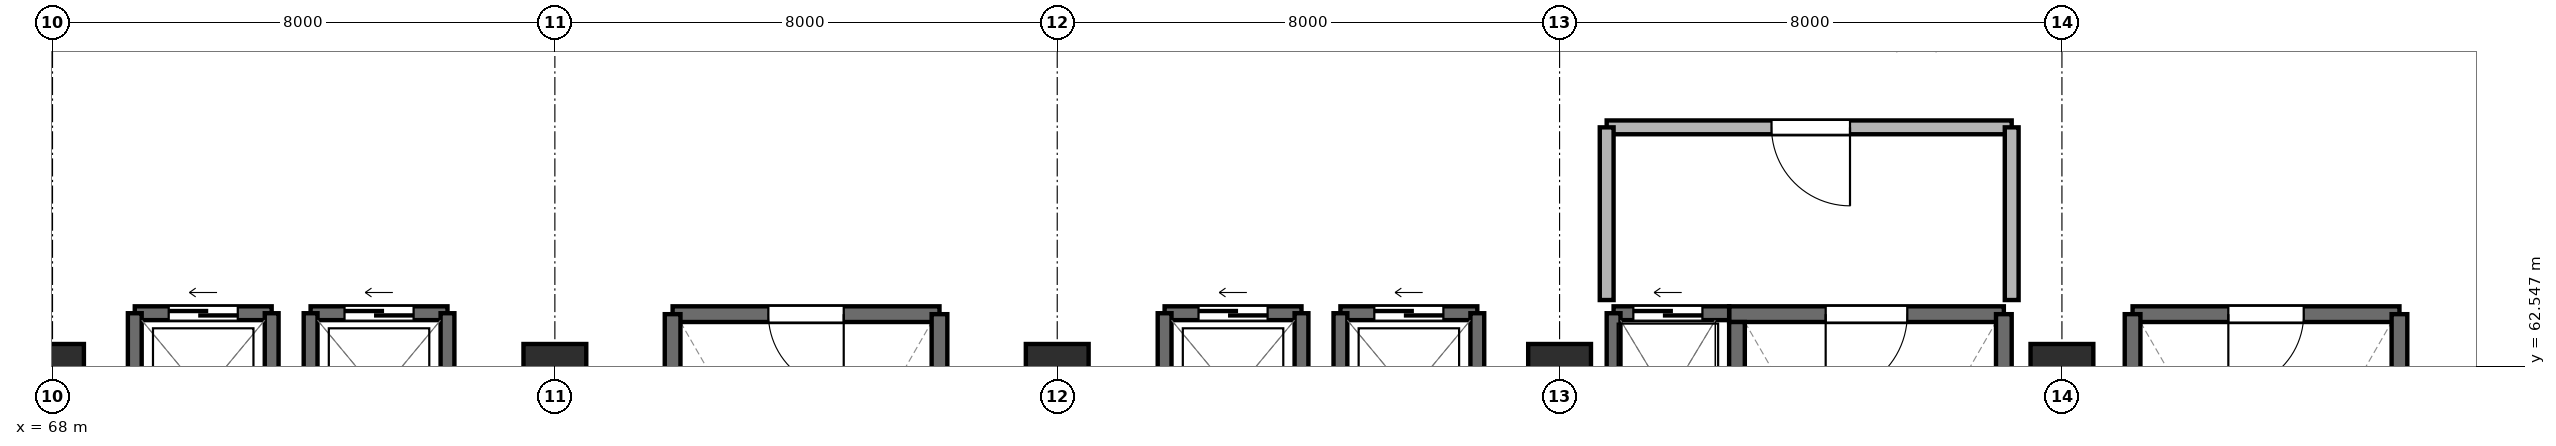
"""IFC4 building model, lengths in metres.
Left out: names, types, materials, properties, quantities, classifications, styles, units other than length and angle.
Written with IfcOpenShell. Run it as: python <this file> out.ifc"""

import sys

from ifc_helpers import new_model, si_unit, direction, frame, frame_2d, origin, origin_2d, place, context, subcontext, project, spatial, rectangle, extrude, element, fill, save


model = new_model("IFC4")
c1 = context("Model", 3, precision=1e-05, world=origin(), true_north=direction((0.0, 1.0)))
c2 = subcontext(c1, "Body", "Model", "MODEL_VIEW")
j1 = project(units=[si_unit("LENGTHUNIT", "METRE"), si_unit("PLANEANGLEUNIT", "RADIAN")], contexts=[c1])
p1 = place(None, origin())
s1 = spatial("IfcSite", under=j1, at=p1, CompositionType="ELEMENT")
p2 = place(p1, origin())
s2 = spatial("IfcBuilding", under=s1, at=p2, CompositionType="ELEMENT")
p3 = place(p2, frame((0.0, 0.0, 4.6)))
s3 = spatial("IfcBuildingStorey", under=s2, at=p3, CompositionType="ELEMENT", Elevation=4.6)
for number, where, z_axis, x_axis in (
    (1, (68.0, 62.4, -0.3), (0.0, 0.0, 1.0), (1.0, 0.0, 0.0)),
    (2, (76.0, 62.4, -0.3), (0.0, 0.0, 1.0), (1.0, 0.0, 0.0)),
    (3, (84.0, 62.4, -0.3), (0.0, 0.0, 1.0), (1.0, 0.0, 0.0)),
    (4, (92.0, 62.4, -0.3), (0.0, 0.0, 1.0), (1.0, 0.0, 0.0)),
    (5, (100.0, 62.4, -0.3), (0.0, 0.0, 1.0), (1.0, 0.0, 0.0)),
):
    element("IfcColumn", number, at=place(p3, frame(where, z_axis=z_axis, x_axis=x_axis)), inside=s3, PredefinedType="COLUMN", context=c2, shape_type="SweptSolid", body=[
        extrude(rectangle(XDim=1.0, YDim=1.0, at=origin_2d()), origin(), (0.0, 0.0, 1.0), 4.65),
    ])
p4 = place(p3, frame((99.075, 63.375, 0.0), z_axis=(0.0, 0.0, 1.0), x_axis=(-1.0, 0.0, 0.0)))
e6 = element("IfcWall", 6, at=p4, inside=s3, PredefinedType="SHEAR", context=c2, shape_type="SweptSolid", body=[
    extrude(rectangle(XDim=4.375, YDim=0.25, at=frame_2d((2.188, 0.0))), origin(), (0.0, 0.0, 1.0), 4.48),
])
p5 = place(p4, frame((1.538, 0.0, 0.0)))
e7 = element("IfcOpeningElement", 7, at=p5, cuts=e6, PredefinedType="OPENING", context=c2, shape_type="SweptSolid", body=[
    extrude(rectangle(XDim=1.3, YDim=2.2, at=frame_2d((0.65, 1.1))), frame((0.0, 0.137, 0.0), z_axis=(0.0, -1.0, 0.0), x_axis=(1.0, 0.0, 0.0)), (0.0, 0.0, 1.0), 0.274),
])
p6 = place(p3, frame((94.825, 63.25, 0.0), z_axis=(0.0, 0.0, 1.0), x_axis=(0.0, -1.0, 0.0)))
e8 = element("IfcWall", 8, at=p6, inside=s3, PredefinedType="SHEAR", context=c2, shape_type="SweptSolid", body=[
    extrude(rectangle(XDim=7.075, YDim=0.25, at=frame_2d((3.538, 0.0))), origin(), (0.0, 0.0, 1.0), 4.48),
])
p7 = place(p3, frame((99.075, 56.175, 0.0), z_axis=(0.0, 0.0, 1.0), x_axis=(0.0, 1.0, 0.0)))
e9 = element("IfcWall", 9, at=p7, inside=s3, PredefinedType="SHEAR", context=c2, shape_type="SweptSolid", body=[
    extrude(rectangle(XDim=7.2, YDim=0.25, at=frame_2d((3.6, 0.0))), origin(), (0.0, 0.0, 1.0), 4.48),
])
p8 = place(p3, frame((82.125, 63.375, 0.0), z_axis=(0.0, 0.0, 1.0), x_axis=(-1.0, 0.0, 0.0)))
e10 = element("IfcWall", 10, at=p8, inside=s3, PredefinedType="SHEAR", context=c2, shape_type="SweptSolid", body=[
    extrude(rectangle(XDim=4.25, YDim=0.25, at=frame_2d((2.125, 0.0))), origin(), (0.0, 0.0, 1.0), 4.48),
])
p9 = place(p8, frame((1.525, 0.0, 0.0)))
e11 = element("IfcOpeningElement", 11, at=p9, cuts=e10, PredefinedType="OPENING", context=c2, shape_type="SweptSolid", body=[
    extrude(rectangle(XDim=1.2, YDim=2.2, at=frame_2d((0.6, 1.1))), frame((0.0, 0.137, 0.0), z_axis=(0.0, -1.0, 0.0), x_axis=(1.0, 0.0, 0.0)), (0.0, 0.0, 1.0), 0.274),
])
for number, where, z_axis, x_axis in (
    (12, (77.875, 63.375, 0.0), (0.0, 0.0, 1.0), (0.0, -1.0, 0.0)),
    (13, (82.125, 56.175, 0.0), (0.0, 0.0, 1.0), (0.0, 1.0, 0.0)),
):
    element("IfcWall", number, at=place(p3, frame(where, z_axis=z_axis, x_axis=x_axis)), inside=s3, PredefinedType="SHEAR", context=c2, shape_type="SweptSolid", body=[
        extrude(rectangle(XDim=7.2, YDim=0.25, at=frame_2d((3.6, 0.0))), origin(), (0.0, 0.0, 1.0), 4.48),
    ])
p10 = place(p3, frame((105.375, 63.375, 0.0), z_axis=(0.0, 0.0, 1.0), x_axis=(-1.0, 0.0, 0.0)))
e14 = element("IfcWall", 14, at=p10, inside=s3, PredefinedType="SHEAR", context=c2, shape_type="SweptSolid", body=[
    extrude(rectangle(XDim=4.25, YDim=0.25, at=frame_2d((2.125, 0.0))), origin(), (0.0, 0.0, 1.0), 4.48),
])
p11 = place(p10, frame((1.525, 0.0, 0.0)))
e15 = element("IfcOpeningElement", 15, at=p11, cuts=e14, PredefinedType="OPENING", context=c2, shape_type="SweptSolid", body=[
    extrude(rectangle(XDim=1.2, YDim=2.2, at=frame_2d((0.6, 1.1))), frame((0.0, 0.137, 0.0), z_axis=(0.0, -1.0, 0.0), x_axis=(1.0, 0.0, 0.0)), (0.0, 0.0, 1.0), 0.274),
])
for number, where, z_axis, x_axis in (
    (16, (101.125, 63.375, 0.0), (0.0, 0.0, 1.0), (0.0, -1.0, 0.0)),
    (17, (105.375, 56.175, 0.0), (0.0, 0.0, 1.0), (0.0, 1.0, 0.0)),
):
    element("IfcWall", number, at=place(p3, frame(where, z_axis=z_axis, x_axis=x_axis)), inside=s3, PredefinedType="SHEAR", context=c2, shape_type="SweptSolid", body=[
        extrude(rectangle(XDim=7.2, YDim=0.25, at=frame_2d((3.6, 0.0))), origin(), (0.0, 0.0, 1.0), 4.48),
    ])
p12 = place(p3, frame((94.7, 63.39, 0.0), z_axis=(0.0, 0.0, 1.0), x_axis=(-1.0, 0.0, 0.0)))
e18 = element("IfcWall", 18, at=p12, inside=s3, PredefinedType="SHEAR", context=c2, shape_type="SweptSolid", body=[
    extrude(rectangle(XDim=1.84, YDim=0.22, at=frame_2d((0.92, 0.0))), origin(), (0.0, 0.0, 1.0), 4.35),
])
p13 = place(p12, frame((0.425, 0.0, 0.0)))
e19 = element("IfcOpeningElement", 19, at=p13, cuts=e18, PredefinedType="OPENING", context=c2, shape_type="SweptSolid", body=[
    extrude(rectangle(XDim=1.1, YDim=2.2, at=frame_2d((0.55, 1.1))), frame((0.0, 0.122, 0.0), z_axis=(0.0, -1.0, 0.0), x_axis=(1.0, 0.0, 0.0)), (0.0, 0.0, 1.0), 0.244),
])
p14 = place(p3, frame((92.86, 63.39, 0.0), z_axis=(0.0, 0.0, 1.0), x_axis=(0.0, -1.0, 0.0)))
e20 = element("IfcWall", 20, at=p14, inside=s3, PredefinedType="SHEAR", context=c2, shape_type="SweptSolid", body=[
    extrude(rectangle(XDim=2.73, YDim=0.22, at=frame_2d((1.365, 0.0))), origin(), (0.0, 0.0, 1.0), 4.35),
])
p15 = place(p3, frame((71.49, 63.39, 0.0), z_axis=(0.0, 0.0, 1.0), x_axis=(-1.0, 0.0, 0.0)))
e21 = element("IfcWall", 21, at=p15, inside=s3, PredefinedType="SHEAR", context=c2, shape_type="SweptSolid", body=[
    extrude(rectangle(XDim=2.18, YDim=0.22, at=frame_2d((1.09, 0.0))), origin(), (0.0, 0.0, 1.0), 4.35),
])
p16 = place(p15, frame((0.54, 0.0, 0.0)))
e22 = element("IfcOpeningElement", 22, at=p16, cuts=e21, PredefinedType="OPENING", context=c2, shape_type="SweptSolid", body=[
    extrude(rectangle(XDim=1.1, YDim=2.2, at=frame_2d((0.55, 1.1))), frame((0.0, 0.122, 0.0), z_axis=(0.0, -1.0, 0.0), x_axis=(1.0, 0.0, 0.0)), (0.0, 0.0, 1.0), 0.244),
])
for number, where, z_axis, x_axis in (
    (23, (69.31, 63.39, 0.0), (0.0, 0.0, 1.0), (0.0, -1.0, 0.0)),
    (24, (71.49, 60.81, 0.0), (0.0, 0.0, 1.0), (0.0, 1.0, 0.0)),
):
    element("IfcWall", number, at=place(p3, frame(where, z_axis=z_axis, x_axis=x_axis)), inside=s3, PredefinedType="SHEAR", context=c2, shape_type="SweptSolid", body=[
        extrude(rectangle(XDim=2.58, YDim=0.22, at=frame_2d((1.29, 0.0))), origin(), (0.0, 0.0, 1.0), 4.35),
    ])
p17 = place(p3, frame((74.29, 63.39, 0.0), z_axis=(0.0, 0.0, 1.0), x_axis=(-1.0, 0.0, 0.0)))
e25 = element("IfcWall", 25, at=p17, inside=s3, PredefinedType="SHEAR", context=c2, shape_type="SweptSolid", body=[
    extrude(rectangle(XDim=2.18, YDim=0.22, at=frame_2d((1.09, 0.0))), origin(), (0.0, 0.0, 1.0), 4.35),
])
p18 = place(p17, frame((0.54, 0.0, 0.0)))
e26 = element("IfcOpeningElement", 26, at=p18, cuts=e25, PredefinedType="OPENING", context=c2, shape_type="SweptSolid", body=[
    extrude(rectangle(XDim=1.1, YDim=2.2, at=frame_2d((0.55, 1.1))), frame((0.0, 0.122, 0.0), z_axis=(0.0, -1.0, 0.0), x_axis=(1.0, 0.0, 0.0)), (0.0, 0.0, 1.0), 0.244),
])
for number, where, z_axis, x_axis in (
    (27, (72.11, 63.39, 0.0), (0.0, 0.0, 1.0), (0.0, -1.0, 0.0)),
    (28, (74.29, 60.81, 0.0), (0.0, 0.0, 1.0), (0.0, 1.0, 0.0)),
):
    element("IfcWall", number, at=place(p3, frame(where, z_axis=z_axis, x_axis=x_axis)), inside=s3, PredefinedType="SHEAR", context=c2, shape_type="SweptSolid", body=[
        extrude(rectangle(XDim=2.58, YDim=0.22, at=frame_2d((1.29, 0.0))), origin(), (0.0, 0.0, 1.0), 4.35),
    ])
p19 = place(p3, frame((87.89, 63.39, 0.0), z_axis=(0.0, 0.0, 1.0), x_axis=(-1.0, 0.0, 0.0)))
e29 = element("IfcWall", 29, at=p19, inside=s3, PredefinedType="SHEAR", context=c2, shape_type="SweptSolid", body=[
    extrude(rectangle(XDim=2.18, YDim=0.22, at=frame_2d((1.09, 0.0))), origin(), (0.0, 0.0, 1.0), 4.35),
])
p20 = place(p19, frame((0.54, 0.0, 0.0)))
e30 = element("IfcOpeningElement", 30, at=p20, cuts=e29, PredefinedType="OPENING", context=c2, shape_type="SweptSolid", body=[
    extrude(rectangle(XDim=1.1, YDim=2.2, at=frame_2d((0.55, 1.1))), frame((0.0, 0.122, 0.0), z_axis=(0.0, -1.0, 0.0), x_axis=(1.0, 0.0, 0.0)), (0.0, 0.0, 1.0), 0.244),
])
for number, where, z_axis, x_axis in (
    (31, (85.71, 63.39, 0.0), (0.0, 0.0, 1.0), (0.0, -1.0, 0.0)),
    (32, (87.89, 60.81, 0.0), (0.0, 0.0, 1.0), (0.0, 1.0, 0.0)),
):
    element("IfcWall", number, at=place(p3, frame(where, z_axis=z_axis, x_axis=x_axis)), inside=s3, PredefinedType="SHEAR", context=c2, shape_type="SweptSolid", body=[
        extrude(rectangle(XDim=2.58, YDim=0.22, at=frame_2d((1.29, 0.0))), origin(), (0.0, 0.0, 1.0), 4.35),
    ])
p21 = place(p3, frame((90.69, 63.39, 0.0), z_axis=(0.0, 0.0, 1.0), x_axis=(-1.0, 0.0, 0.0)))
e33 = element("IfcWall", 33, at=p21, inside=s3, PredefinedType="SHEAR", context=c2, shape_type="SweptSolid", body=[
    extrude(rectangle(XDim=2.18, YDim=0.22, at=frame_2d((1.09, 0.0))), origin(), (0.0, 0.0, 1.0), 4.35),
])
p22 = place(p21, frame((0.54, 0.0, 0.0)))
e34 = element("IfcOpeningElement", 34, at=p22, cuts=e33, PredefinedType="OPENING", context=c2, shape_type="SweptSolid", body=[
    extrude(rectangle(XDim=1.1, YDim=2.2, at=frame_2d((0.55, 1.1))), frame((0.0, 0.122, 0.0), z_axis=(0.0, -1.0, 0.0), x_axis=(1.0, 0.0, 0.0)), (0.0, 0.0, 1.0), 0.244),
])
for number, where, z_axis, x_axis in (
    (35, (88.51, 63.39, 0.0), (0.0, 0.0, 1.0), (0.0, -1.0, 0.0)),
    (36, (90.69, 60.81, 0.0), (0.0, 0.0, 1.0), (0.0, 1.0, 0.0)),
):
    element("IfcWall", number, at=place(p3, frame(where, z_axis=z_axis, x_axis=x_axis)), inside=s3, PredefinedType="SHEAR", context=c2, shape_type="SweptSolid", body=[
        extrude(rectangle(XDim=2.58, YDim=0.22, at=frame_2d((1.29, 0.0))), origin(), (0.0, 0.0, 1.0), 4.35),
    ])
p23 = place(p3, frame((92.75, 66.35, 0.0), z_axis=(0.0, 0.0, 1.0), x_axis=(1.0, 0.0, 0.0)))
e37 = element("IfcWall", 37, at=p23, inside=s3, PredefinedType="PARTITIONING", context=c2, shape_type="SweptSolid", body=[
    extrude(rectangle(XDim=6.45, YDim=0.22, at=frame_2d((3.225, 0.0))), origin(), (0.0, 0.0, 1.0), 4.08),
])
p24 = place(p23, frame((2.625, 0.0, 0.0)))
e38 = element("IfcOpeningElement", 38, at=p24, cuts=e37, PredefinedType="OPENING", context=c2, shape_type="SweptSolid", body=[
    extrude(rectangle(XDim=1.25, YDim=2.2, at=frame_2d((0.625, 1.1))), frame((0.0, 0.122, 0.0), z_axis=(0.0, -1.0, 0.0), x_axis=(1.0, 0.0, 0.0)), (0.0, 0.0, 1.0), 0.244),
])
for number, where, z_axis, x_axis in (
    (39, (92.75, 63.6, 0.0), (0.0, 0.0, 1.0), (0.0, 1.0, 0.0)),
    (40, (99.2, 63.6, 0.0), (0.0, 0.0, 1.0), (0.0, 1.0, 0.0)),
):
    element("IfcWall", number, at=place(p3, frame(where, z_axis=z_axis, x_axis=x_axis)), inside=s3, PredefinedType="PARTITIONING", context=c2, shape_type="SweptSolid", body=[
        extrude(rectangle(XDim=2.75, YDim=0.22, at=frame_2d((1.375, 0.0))), origin(), (0.0, 0.0, 1.0), 4.08),
    ])
p25 = place(p5, origin())
e41 = element("IfcDoor", 41, at=p25, inside=s3, OperationType="SINGLE_SWING_RIGHT", PredefinedType="DOOR", context=c2, shape_type="SweptSolid", body=[
    extrude(rectangle(XDim=1.3, YDim=2.2, at=frame_2d((0.65, 1.1))), frame((0.0, 0.025, 0.0), z_axis=(0.0, -1.0, 0.0), x_axis=(1.0, 0.0, 0.0)), (0.0, 0.0, 1.0), 0.05),
])
fill(e7, e41)
p26 = place(p9, origin())
e42 = element("IfcDoor", 42, at=p26, inside=s3, OperationType="SINGLE_SWING_LEFT", PredefinedType="DOOR", context=c2, shape_type="SweptSolid", body=[
    extrude(rectangle(XDim=1.2, YDim=2.2, at=frame_2d((0.6, 1.1))), frame((0.0, 0.025, 0.0), z_axis=(0.0, -1.0, 0.0), x_axis=(1.0, 0.0, 0.0)), (0.0, 0.0, 1.0), 0.05),
])
fill(e11, e42)
p27 = place(p11, origin())
e43 = element("IfcDoor", 43, at=p27, inside=s3, OperationType="SINGLE_SWING_RIGHT", PredefinedType="DOOR", context=c2, shape_type="SweptSolid", body=[
    extrude(rectangle(XDim=1.2, YDim=2.2, at=frame_2d((0.6, 1.1))), frame((0.0, 0.025, 0.0), z_axis=(0.0, -1.0, 0.0), x_axis=(1.0, 0.0, 0.0)), (0.0, 0.0, 1.0), 0.05),
])
fill(e15, e43)
p28 = place(p13, origin())
e44 = element("IfcDoor", 44, at=p28, inside=s3, OperationType="SLIDING_TO_RIGHT", PredefinedType="DOOR", context=c2, shape_type="SweptSolid", body=[
    extrude(rectangle(XDim=1.1, YDim=2.2, at=frame_2d((0.55, 1.1))), frame((0.0, 0.025, 0.0), z_axis=(0.0, -1.0, 0.0), x_axis=(1.0, 0.0, 0.0)), (0.0, 0.0, 1.0), 0.05),
])
fill(e19, e44)
p29 = place(p16, origin())
e45 = element("IfcDoor", 45, at=p29, inside=s3, OperationType="SLIDING_TO_RIGHT", PredefinedType="DOOR", context=c2, shape_type="SweptSolid", body=[
    extrude(rectangle(XDim=1.1, YDim=2.2, at=frame_2d((0.55, 1.1))), frame((0.0, 0.025, 0.0), z_axis=(0.0, -1.0, 0.0), x_axis=(1.0, 0.0, 0.0)), (0.0, 0.0, 1.0), 0.05),
])
fill(e22, e45)
p30 = place(p18, origin())
e46 = element("IfcDoor", 46, at=p30, inside=s3, OperationType="SLIDING_TO_RIGHT", PredefinedType="DOOR", context=c2, shape_type="SweptSolid", body=[
    extrude(rectangle(XDim=1.1, YDim=2.2, at=frame_2d((0.55, 1.1))), frame((0.0, 0.025, 0.0), z_axis=(0.0, -1.0, 0.0), x_axis=(1.0, 0.0, 0.0)), (0.0, 0.0, 1.0), 0.05),
])
fill(e26, e46)
p31 = place(p20, origin())
e47 = element("IfcDoor", 47, at=p31, inside=s3, OperationType="SLIDING_TO_RIGHT", PredefinedType="DOOR", context=c2, shape_type="SweptSolid", body=[
    extrude(rectangle(XDim=1.1, YDim=2.2, at=frame_2d((0.55, 1.1))), frame((0.0, 0.025, 0.0), z_axis=(0.0, -1.0, 0.0), x_axis=(1.0, 0.0, 0.0)), (0.0, 0.0, 1.0), 0.05),
])
fill(e30, e47)
p32 = place(p22, origin())
e48 = element("IfcDoor", 48, at=p32, inside=s3, OperationType="SLIDING_TO_RIGHT", PredefinedType="DOOR", context=c2, shape_type="SweptSolid", body=[
    extrude(rectangle(XDim=1.1, YDim=2.2, at=frame_2d((0.55, 1.1))), frame((0.0, 0.025, 0.0), z_axis=(0.0, -1.0, 0.0), x_axis=(1.0, 0.0, 0.0)), (0.0, 0.0, 1.0), 0.05),
])
fill(e34, e48)
p33 = place(p24, frame((1.25, 0.0, 0.0), z_axis=(0.0, 0.0, 1.0), x_axis=(-1.0, 0.0, 0.0)))
e49 = element("IfcDoor", 49, at=p33, inside=s3, OperationType="SINGLE_SWING_RIGHT", PredefinedType="DOOR", context=c2, shape_type="SweptSolid", body=[
    extrude(rectangle(XDim=1.25, YDim=2.2, at=frame_2d((0.625, 1.1))), frame((0.0, 0.025, 0.0), z_axis=(0.0, -1.0, 0.0), x_axis=(1.0, 0.0, 0.0)), (0.0, 0.0, 1.0), 0.05),
])
fill(e38, e49)
save(model, sys.argv[1])
